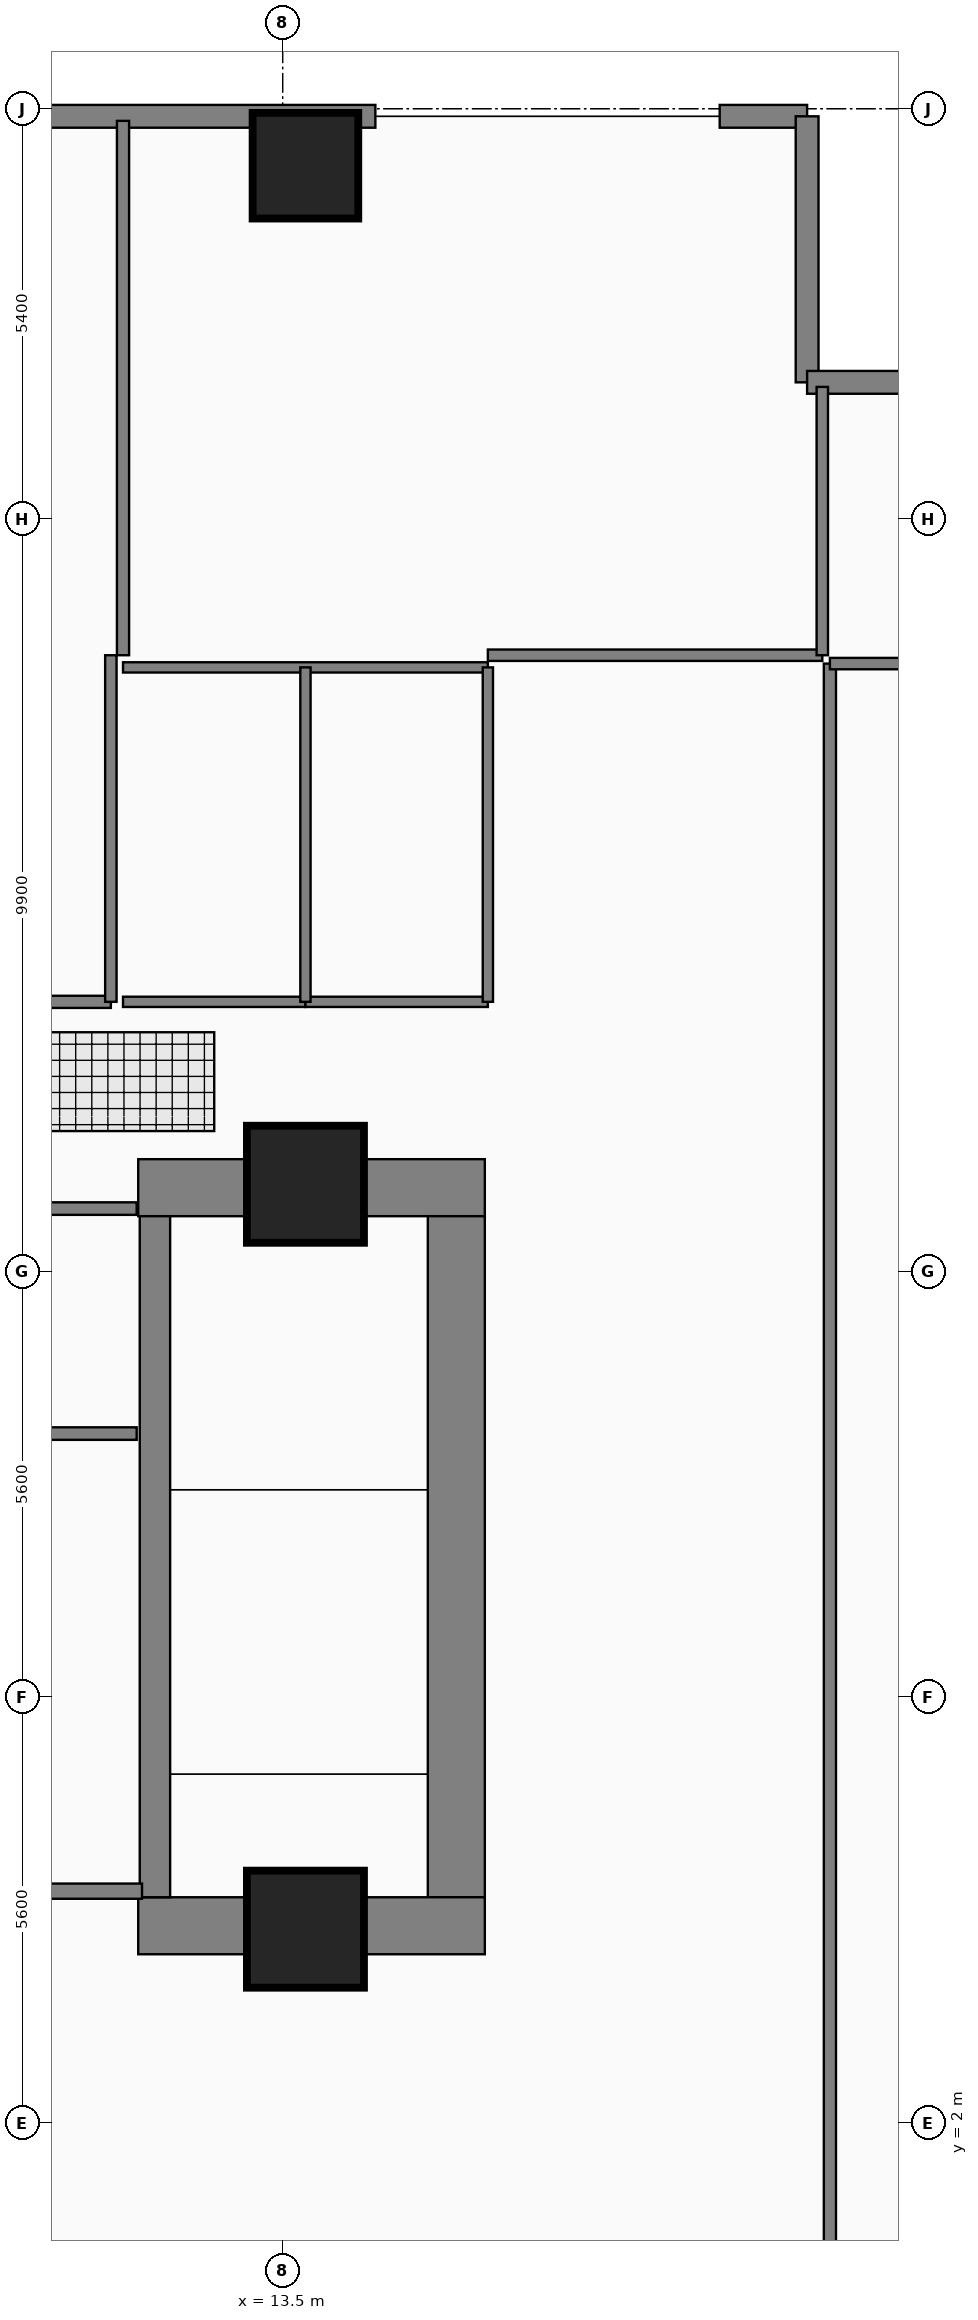
"""IFC4 building model, lengths in metres.
Left out: names, types, materials, properties, quantities, classifications, styles, units other than length and angle.
Written with IfcOpenShell. Run it as: python <this file> out.ifc"""

import sys

from ifc_helpers import new_model, si_unit, direction, frame, frame_2d, origin, origin_2d, place, context, subcontext, project, spatial, rectangle, extrude, element, fill, save


model = new_model("IFC4")
c1 = context("Model", 3, precision=1e-05, world=origin(), true_north=direction((0.0, 1.0)))
c2 = subcontext(c1, "Body", "Model", "MODEL_VIEW")
j1 = project(units=[si_unit("LENGTHUNIT", "METRE"), si_unit("PLANEANGLEUNIT", "RADIAN")], contexts=[c1])
p1 = place(None, origin())
s1 = spatial("IfcSite", under=j1, at=p1, CompositionType="ELEMENT")
p2 = place(p1, origin())
s2 = spatial("IfcBuilding", under=s1, at=p2, CompositionType="ELEMENT")
p3 = place(p2, frame((0.0, 0.0, 154.05)))
s3 = spatial("IfcBuildingStorey", under=s2, at=p3, CompositionType="ELEMENT", Elevation=154.05)
p4 = place(p3, frame((11.6, 14.305, 0.0), z_axis=(0.0, 0.0, 1.0), x_axis=(1.0, 0.0, 0.0)))
e1 = element("IfcWall", 1, at=p4, inside=s3, PredefinedType="SHEAR", context=c2, shape_type="SweptSolid", body=[
    extrude(rectangle(XDim=4.56, YDim=0.75, at=frame_2d((2.28, 0.0))), origin(), (0.0, 0.0, 1.0), 4.31),
])
p5 = place(p3, frame((15.785, 4.97, 0.0), z_axis=(0.0, 0.0, 1.0), x_axis=(0.0, 1.0, 0.0)))
e2 = element("IfcWall", 2, at=p5, inside=s3, PredefinedType="SHEAR", context=c2, shape_type="SweptSolid", body=[
    extrude(rectangle(XDim=8.96, YDim=0.75, at=frame_2d((4.48, 0.0))), origin(), (0.0, 0.0, 1.0), 4.31),
])
p6 = place(p3, frame((11.6, 4.595, 0.0), z_axis=(0.0, 0.0, 1.0), x_axis=(1.0, 0.0, 0.0)))
e3 = element("IfcWall", 3, at=p6, inside=s3, PredefinedType="SHEAR", context=c2, shape_type="SweptSolid", body=[
    extrude(rectangle(XDim=4.56, YDim=0.75, at=frame_2d((2.28, 0.0))), origin(), (0.0, 0.0, 1.0), 4.31),
])
p7 = place(p3, frame((11.82, 13.93, 0.0), z_axis=(0.0, 0.0, 1.0), x_axis=(0.0, -1.0, 0.0)))
e4 = element("IfcWall", 4, at=p7, inside=s3, PredefinedType="SHEAR", context=c2, shape_type="SweptSolid", body=[
    extrude(rectangle(XDim=8.96, YDim=0.4, at=frame_2d((4.48, 0.0))), origin(), (0.0, 0.0, 1.0), 4.31),
])
p8 = place(p7, frame((7.53, 0.0, 0.0)))
e5 = element("IfcOpeningElement", 5, at=p8, cuts=e4, PredefinedType="OPENING", context=c2, shape_type="SweptSolid", body=[
    extrude(rectangle(XDim=1.12, YDim=2.22, at=frame_2d((0.56, 1.11))), frame((0.0, 0.21, 0.0), z_axis=(0.0, -1.0, 0.0), x_axis=(1.0, 0.0, 0.0)), (0.0, 0.0, 1.0), 0.42),
])
for number, where, z_axis, x_axis in (
    (6, (13.8, 14.35, 0.0), (0.0, 0.0, 1.0), (1.0, 0.0, 0.0)),
    (7, (13.8, 4.55, 0.0), (0.0, 0.0, 1.0), (1.0, 0.0, 0.0)),
):
    element("IfcColumn", number, at=place(p3, frame(where, z_axis=z_axis, x_axis=x_axis)), inside=s3, PredefinedType="COLUMN", context=c2, shape_type="SweptSolid", body=[
        extrude(rectangle(XDim=1.5, YDim=1.5, at=origin_2d()), origin(), (0.0, 0.0, 1.0), 4.5),
    ])
p9 = place(p3, frame((13.8, 27.75, 0.0), z_axis=(0.0, 0.0, 1.0), x_axis=(1.0, 0.0, 0.0)))
e8 = element("IfcColumn", 8, at=p9, inside=s3, PredefinedType="COLUMN", context=c2, shape_type="SweptSolid", body=[
    extrude(rectangle(XDim=1.35, YDim=1.35, at=origin_2d()), origin(), (0.0, 0.0, 1.0), 4.5),
])
p10 = place(p3, frame((3.68, 28.4, 0.0), z_axis=(0.0, 0.0, 1.0), x_axis=(1.0, 0.0, 0.0)))
e9 = element("IfcWall", 9, at=p10, inside=s3, PredefinedType="STANDARD", context=c2, shape_type="SweptSolid", body=[
    extrude(rectangle(XDim=11.04, YDim=0.3, at=frame_2d((5.52, 0.0))), origin(), (0.0, 0.0, 1.0), 4.28),
])
p11 = place(p10, frame((2.895, 0.0, 0.0)))
e10 = element("IfcOpeningElement", 10, at=p11, cuts=e9, PredefinedType="OPENING", context=c2, shape_type="SweptSolid", body=[
    extrude(rectangle(XDim=1.05, YDim=2.2, at=frame_2d((0.525, 1.1))), frame((0.0, 0.16, 0.0), z_axis=(0.0, -1.0, 0.0), x_axis=(1.0, 0.0, 0.0)), (0.0, 0.0, 1.0), 0.32),
])
p12 = place(p10, frame((8.055, 0.0, 0.95)))
e11 = element("IfcOpeningElement", 11, at=p12, cuts=e9, PredefinedType="OPENING", context=c2, shape_type="SweptSolid", body=[
    extrude(rectangle(XDim=1.15, YDim=1.55, at=frame_2d((0.575, 0.775))), frame((0.0, 0.16, 0.0), z_axis=(0.0, -1.0, 0.0), x_axis=(1.0, 0.0, 0.0)), (0.0, 0.0, 1.0), 0.32),
])
p13 = place(p3, frame((19.25, 28.4, 0.0), z_axis=(0.0, 0.0, 1.0), x_axis=(1.0, 0.0, 0.0)))
e12 = element("IfcWall", 12, at=p13, inside=s3, PredefinedType="STANDARD", context=c2, shape_type="SweptSolid", body=[
    extrude(rectangle(XDim=1.15, YDim=0.3, at=frame_2d((0.575, 0.0))), origin(), (0.0, 0.0, 1.0), 4.28),
])
for number, where, z_axis, x_axis in (
    (13, (20.4, 28.4, 0.0), (0.0, 0.0, 1.0), (0.0, -1.0, 0.0)),
    (14, (20.4, 24.9, 0.0), (0.0, 0.0, 1.0), (1.0, 0.0, 0.0)),
):
    element("IfcWall", number, at=place(p3, frame(where, z_axis=z_axis, x_axis=x_axis)), inside=s3, PredefinedType="STANDARD", context=c2, shape_type="SweptSolid", body=[
        extrude(rectangle(XDim=3.5, YDim=0.3, at=frame_2d((1.75, 0.0))), origin(), (0.0, 0.0, 1.0), 4.28),
    ])
p14 = place(p3, frame((9.42, 11.07, 0.0), z_axis=(0.0, 0.0, 1.0), x_axis=(1.0, 0.0, 0.0)))
e15 = element("IfcWall", 15, at=p14, inside=s3, PredefinedType="PARTITIONING", context=c2, shape_type="SweptSolid", body=[
    extrude(rectangle(XDim=2.16, YDim=0.165, at=frame_2d((1.08, 0.0))), origin(), (0.0, 0.0, 1.0), 4.28),
])
p15 = place(p14, frame((0.53, 0.0, 0.0)))
e16 = element("IfcOpeningElement", 16, at=p15, cuts=e15, PredefinedType="OPENING", context=c2, shape_type="SweptSolid", body=[
    extrude(rectangle(XDim=1.15, YDim=2.25, at=frame_2d((0.575, 1.125))), frame((0.0, 0.093, 0.0), z_axis=(0.0, -1.0, 0.0), x_axis=(1.0, 0.0, 0.0)), (0.0, 0.0, 1.0), 0.185),
])
p16 = place(p3, frame((-2.04, 16.75, 0.0), z_axis=(0.0, 0.0, 1.0), x_axis=(1.0, 0.0, 0.0)))
e17 = element("IfcWall", 17, at=p16, inside=s3, PredefinedType="PARTITIONING", context=c2, shape_type="SweptSolid", body=[
    extrude(rectangle(XDim=13.28, YDim=0.16, at=frame_2d((6.64, 0.0))), origin(), (0.0, 0.0, 1.0), 3.823),
])
p17 = place(p16, frame((8.45, 0.0, 0.0)))
e18 = element("IfcOpeningElement", 18, at=p17, cuts=e17, PredefinedType="OPENING", context=c2, shape_type="SweptSolid", body=[
    extrude(rectangle(XDim=1.08, YDim=2.18, at=frame_2d((0.54, 1.09))), frame((0.0, 0.09, 0.0), z_axis=(0.0, -1.0, 0.0), x_axis=(1.0, 0.0, 0.0)), (0.0, 0.0, 1.0), 0.18),
])
p18 = place(p3, frame((20.7, -6.2, 0.0), z_axis=(0.0, 0.0, 1.0), x_axis=(0.0, 1.0, 0.0)))
e19 = element("IfcWall", 19, at=p18, inside=s3, PredefinedType="PARTITIONING", context=c2, shape_type="SweptSolid", body=[
    extrude(rectangle(XDim=27.4, YDim=0.16, at=frame_2d((13.7, 0.0))), origin(), (0.0, 0.0, 1.0), 4.28),
])
p19 = place(p18, frame((13.16, 0.0, 0.0)))
e20 = element("IfcOpeningElement", 20, at=p19, cuts=e19, PredefinedType="OPENING", context=c2, shape_type="SweptSolid", body=[
    extrude(rectangle(XDim=1.08, YDim=2.18, at=frame_2d((0.54, 1.09))), frame((0.0, 0.09, 0.0), z_axis=(0.0, -1.0, 0.0), x_axis=(1.0, 0.0, 0.0)), (0.0, 0.0, 1.0), 0.18),
])
p20 = place(p3, frame((11.4, 16.75, 0.0), z_axis=(0.0, 0.0, 1.0), x_axis=(1.0, 0.0, 0.0)))
e21 = element("IfcWall", 21, at=p20, inside=s3, PredefinedType="PLUMBINGWALL", context=c2, shape_type="SweptSolid", body=[
    extrude(rectangle(XDim=2.4, YDim=0.135, at=frame_2d((1.2, 0.0))), origin(), (0.0, 0.0, 1.0), 3.823),
])
p21 = place(p20, frame((0.74, 0.0, 0.0)))
e22 = element("IfcOpeningElement", 22, at=p21, cuts=e21, PredefinedType="OPENING", context=c2, shape_type="SweptSolid", body=[
    extrude(rectangle(XDim=0.92, YDim=2.12, at=frame_2d((0.46, 1.06))), frame((0.0, 0.077, 0.0), z_axis=(0.0, -1.0, 0.0), x_axis=(1.0, 0.0, 0.0)), (0.0, 0.0, 1.0), 0.155),
])
p22 = place(p3, frame((13.8, 16.75, 0.0), z_axis=(0.0, 0.0, 1.0), x_axis=(1.0, 0.0, 0.0)))
e23 = element("IfcWall", 23, at=p22, inside=s3, PredefinedType="PLUMBINGWALL", context=c2, shape_type="SweptSolid", body=[
    extrude(rectangle(XDim=2.4, YDim=0.135, at=frame_2d((1.2, 0.0))), origin(), (0.0, 0.0, 1.0), 4.28),
])
p23 = place(p22, frame((0.74, 0.0, 0.0)))
e24 = element("IfcOpeningElement", 24, at=p23, cuts=e23, PredefinedType="OPENING", context=c2, shape_type="SweptSolid", body=[
    extrude(rectangle(XDim=0.92, YDim=2.12, at=frame_2d((0.46, 1.06))), frame((0.0, 0.077, 0.0), z_axis=(0.0, -1.0, 0.0), x_axis=(1.0, 0.0, 0.0)), (0.0, 0.0, 1.0), 0.155),
])
p24 = place(p3, frame((11.4, 21.31, 0.0), z_axis=(0.0, 0.0, 1.0), x_axis=(0.0, 1.0, 0.0)))
e25 = element("IfcWall", 25, at=p24, inside=s3, PredefinedType="PARTITIONING", context=c2, shape_type="SweptSolid", body=[
    extrude(rectangle(XDim=7.03, YDim=0.16, at=frame_2d((3.515, 0.0))), origin(), (0.0, 0.0, 1.0), 4.28),
])
p25 = place(p24, frame((2.975, 0.0, 0.0)))
e26 = element("IfcOpeningElement", 26, at=p25, cuts=e25, PredefinedType="OPENING", context=c2, shape_type="SweptSolid", body=[
    extrude(rectangle(XDim=1.08, YDim=2.18, at=frame_2d((0.54, 1.09))), frame((0.0, 0.09, 0.0), z_axis=(0.0, -1.0, 0.0), x_axis=(1.0, 0.0, 0.0)), (0.0, 0.0, 1.0), 0.18),
])
p26 = place(p3, frame((8.8, 5.05, 0.0), z_axis=(0.0, 0.0, 1.0), x_axis=(1.0, 0.0, 0.0)))
e27 = element("IfcWall", 27, at=p26, inside=s3, PredefinedType="PARTITIONING", context=c2, shape_type="SweptSolid", body=[
    extrude(rectangle(XDim=2.85, YDim=0.2, at=frame_2d((1.425, 0.0))), origin(), (0.0, 0.0, 1.0), 4.28),
])
p27 = place(p3, frame((9.42, 14.03, 0.0), z_axis=(0.0, 0.0, 1.0), x_axis=(1.0, 0.0, 0.0)))
e28 = element("IfcWall", 28, at=p27, inside=s3, PredefinedType="PARTITIONING", context=c2, shape_type="SweptSolid", body=[
    extrude(rectangle(XDim=2.16, YDim=0.165, at=frame_2d((1.08, 0.0))), origin(), (0.0, 0.0, 1.0), 4.28),
])
p28 = place(p3, frame((11.24, 16.75, 0.0), z_axis=(0.0, 0.0, 1.0), x_axis=(0.0, 1.0, 0.0)))
e29 = element("IfcWall", 29, at=p28, inside=s3, PredefinedType="PARTITIONING", context=c2, shape_type="SweptSolid", body=[
    extrude(rectangle(XDim=4.56, YDim=0.15, at=frame_2d((2.28, 0.0))), origin(), (0.0, 0.0, 1.0), 4.28),
])
p29 = place(p3, frame((20.7, 21.2, 0.0), z_axis=(0.0, 0.0, 1.0), x_axis=(1.0, 0.0, 0.0)))
e30 = element("IfcWall", 30, at=p29, inside=s3, PredefinedType="PARTITIONING", context=c2, shape_type="SweptSolid", body=[
    extrude(rectangle(XDim=3.14, YDim=0.15, at=frame_2d((1.57, 0.0))), origin(), (0.0, 0.0, 1.0), 4.28),
])
p30 = place(p3, frame((11.4, 21.15, 0.0), z_axis=(0.0, 0.0, 1.0), x_axis=(1.0, 0.0, 0.0)))
e31 = element("IfcWall", 31, at=p30, inside=s3, PredefinedType="PLUMBINGWALL", context=c2, shape_type="SweptSolid", body=[
    extrude(rectangle(XDim=4.8, YDim=0.135, at=frame_2d((2.4, 0.0))), origin(), (0.0, 0.0, 1.0), 4.28),
])
p31 = place(p3, frame((16.2, 16.75, 0.0), z_axis=(0.0, 0.0, 1.0), x_axis=(0.0, 1.0, 0.0)))
e32 = element("IfcWall", 32, at=p31, inside=s3, PredefinedType="PLUMBINGWALL", context=c2, shape_type="SweptSolid", body=[
    extrude(rectangle(XDim=4.4, YDim=0.135, at=frame_2d((2.2, 0.0))), origin(), (0.0, 0.0, 1.0), 4.28),
])
p32 = place(p3, frame((13.8, 16.75, 0.0), z_axis=(0.0, 0.0, 1.0), x_axis=(0.0, 1.0, 0.0)))
e33 = element("IfcWall", 33, at=p32, inside=s3, PredefinedType="PLUMBINGWALL", context=c2, shape_type="SweptSolid", body=[
    extrude(rectangle(XDim=4.4, YDim=0.135, at=frame_2d((2.2, 0.0))), origin(), (0.0, 0.0, 1.0), 3.353),
])
p33 = place(p3, frame((16.2, 21.31, 0.0), z_axis=(0.0, 0.0, 1.0), x_axis=(1.0, 0.0, 0.0)))
e34 = element("IfcWall", 34, at=p33, inside=s3, PredefinedType="PARTITIONING", context=c2, shape_type="SweptSolid", body=[
    extrude(rectangle(XDim=4.4, YDim=0.15, at=frame_2d((2.2, 0.0))), origin(), (0.0, 0.0, 1.0), 4.28),
])
p34 = place(p3, frame((20.6, 21.31, 0.0), z_axis=(0.0, 0.0, 1.0), x_axis=(0.0, 1.0, 0.0)))
e35 = element("IfcWall", 35, at=p34, inside=s3, PredefinedType="PARTITIONING", context=c2, shape_type="SweptSolid", body=[
    extrude(rectangle(XDim=3.53, YDim=0.15, at=frame_2d((1.765, 0.0))), origin(), (0.0, 0.0, 1.0), 4.28),
])
p35 = place(p12, origin())
e36 = element("IfcWindow", 36, at=p35, inside=s3, PartitioningType="SINGLE_PANEL", PredefinedType="WINDOW", context=c2, shape_type="SweptSolid", body=[
    extrude(rectangle(XDim=1.15, YDim=1.55, at=frame_2d((0.575, 0.775))), frame((0.0, 0.03, 0.0), z_axis=(0.0, -1.0, 0.0), x_axis=(1.0, 0.0, 0.0)), (0.0, 0.0, 1.0), 0.06),
])
fill(e11, e36)
p36 = place(p8, origin())
e37 = element("IfcDoor", 37, at=p36, inside=s3, OperationType="SINGLE_SWING_RIGHT", PredefinedType="DOOR", context=c2, shape_type="SweptSolid", body=[
    extrude(rectangle(XDim=1.12, YDim=2.22, at=frame_2d((0.56, 1.11))), frame((0.0, 0.025, 0.0), z_axis=(0.0, -1.0, 0.0), x_axis=(1.0, 0.0, 0.0)), (0.0, 0.0, 1.0), 0.05),
])
fill(e5, e37)
p37 = place(p15, origin())
e38 = element("IfcDoor", 38, at=p37, inside=s3, OperationType="SLIDING_TO_LEFT", PredefinedType="DOOR", context=c2, shape_type="SweptSolid", body=[
    extrude(rectangle(XDim=1.15, YDim=2.25, at=frame_2d((0.575, 1.125))), frame((0.0, 0.025, 0.0), z_axis=(0.0, -1.0, 0.0), x_axis=(1.0, 0.0, 0.0)), (0.0, 0.0, 1.0), 0.05),
])
fill(e16, e38)
p38 = place(p19, origin())
e39 = element("IfcDoor", 39, at=p38, inside=s3, OperationType="SINGLE_SWING_LEFT", PredefinedType="DOOR", context=c2, shape_type="SweptSolid", body=[
    extrude(rectangle(XDim=1.08, YDim=2.18, at=frame_2d((0.54, 1.09))), frame((0.0, 0.025, 0.0), z_axis=(0.0, -1.0, 0.0), x_axis=(1.0, 0.0, 0.0)), (0.0, 0.0, 1.0), 0.05),
])
fill(e20, e39)
p39 = place(p21, origin())
e40 = element("IfcDoor", 40, at=p39, inside=s3, OperationType="SINGLE_SWING_RIGHT", PredefinedType="DOOR", context=c2, shape_type="SweptSolid", body=[
    extrude(rectangle(XDim=0.92, YDim=2.12, at=frame_2d((0.46, 1.06))), frame((0.0, 0.025, 0.0), z_axis=(0.0, -1.0, 0.0), x_axis=(1.0, 0.0, 0.0)), (0.0, 0.0, 1.0), 0.05),
])
fill(e22, e40)
p40 = place(p23, origin())
e41 = element("IfcDoor", 41, at=p40, inside=s3, OperationType="SINGLE_SWING_LEFT", PredefinedType="DOOR", context=c2, shape_type="SweptSolid", body=[
    extrude(rectangle(XDim=0.92, YDim=2.12, at=frame_2d((0.46, 1.06))), frame((0.0, 0.025, 0.0), z_axis=(0.0, -1.0, 0.0), x_axis=(1.0, 0.0, 0.0)), (0.0, 0.0, 1.0), 0.05),
])
fill(e24, e41)
p41 = place(p25, origin())
e42 = element("IfcDoor", 42, at=p41, inside=s3, OperationType="SINGLE_SWING_RIGHT", PredefinedType="DOOR", context=c2, shape_type="SweptSolid", body=[
    extrude(rectangle(XDim=1.08, YDim=2.18, at=frame_2d((0.54, 1.09))), frame((0.0, 0.025, 0.0), z_axis=(0.0, -1.0, 0.0), x_axis=(1.0, 0.0, 0.0)), (0.0, 0.0, 1.0), 0.05),
])
fill(e26, e42)
save(model, sys.argv[1])
